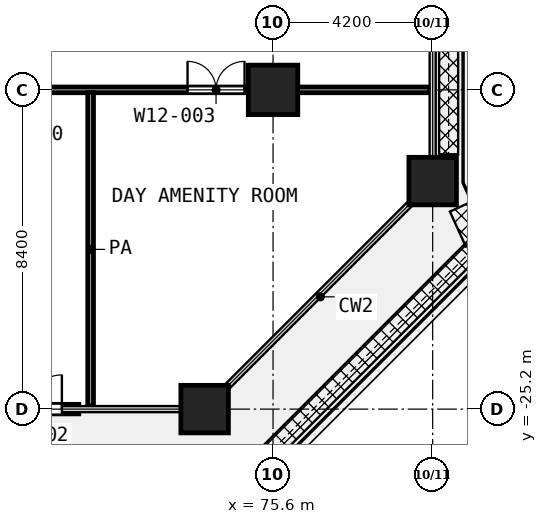
"""IFC4 building model, lengths in metres.
Left out: names, types, materials, properties, quantities, classifications, styles, units other than length and angle.
Written with IfcOpenShell. Run it as: python <this file> out.ifc"""

import sys

from ifc_helpers import new_model, si_unit, direction, frame, frame_2d, origin, origin_2d, place, context, subcontext, project, spatial, rectangle, extrude, element, fill, save


model = new_model("IFC4")
c1 = context("Model", 3, precision=1e-05, world=origin(), true_north=direction((0.0, 1.0)))
c2 = subcontext(c1, "Body", "Model", "MODEL_VIEW")
j1 = project(units=[si_unit("LENGTHUNIT", "METRE"), si_unit("PLANEANGLEUNIT", "RADIAN")], contexts=[c1])
p1 = place(None, origin())
s1 = spatial("IfcSite", under=j1, at=p1, CompositionType="ELEMENT")
p2 = place(p1, origin())
s2 = spatial("IfcBuilding", under=s1, at=p2, CompositionType="ELEMENT")
p3 = place(p2, frame((0.0, 0.0, 77.0)))
s3 = spatial("IfcBuildingStorey", under=s2, at=p3, CompositionType="ELEMENT", Elevation=77.0)
p4 = place(p3, frame((75.6, -16.8, 0.0), z_axis=(0.0, 0.0, 1.0), x_axis=(1.0, 0.0, 0.0)))
e1 = element("IfcColumn", 1, at=p4, inside=s3, PredefinedType="COLUMN", context=c2, shape_type="SweptSolid", body=[
    extrude(rectangle(XDim=1.3, YDim=1.3, at=origin_2d()), origin(), (0.0, 0.0, 1.0), 4.2),
])
for number, where, z_axis, x_axis in (
    (2, (79.8, -19.2, 0.0), (0.0, 0.0, 1.0), (1.0, 0.0, 0.0)),
    (3, (73.8, -25.2, 0.0), (0.0, 0.0, 1.0), (1.0, 0.0, 0.0)),
):
    element("IfcColumn", number, at=place(p3, frame(where, z_axis=z_axis, x_axis=x_axis)), inside=s3, PredefinedType="COLUMN", context=c2, shape_type="SweptSolid", body=[
        extrude(rectangle(XDim=1.25, YDim=1.25, at=origin_2d()), origin(), (0.0, 0.0, 1.0), 4.2),
    ])
p5 = place(p3, frame((67.8, -25.2, 0.0), z_axis=(0.0, 0.0, 1.0), x_axis=(1.0, 0.0, 0.0)))
e4 = element("IfcWall", 4, at=p5, inside=s3, PredefinedType="SOLIDWALL", context=c2, shape_type="SweptSolid", body=[
    extrude(rectangle(XDim=2.688, YDim=0.25, at=frame_2d((1.344, 0.0))), origin(), (0.0, 0.0, 1.0), 3.78),
])
p6 = place(p5, frame((0.444, 0.0, 0.0)))
e5 = element("IfcOpeningElement", 5, at=p6, cuts=e4, PredefinedType="OPENING", context=c2, shape_type="SweptSolid", body=[
    extrude(rectangle(XDim=1.8, YDim=2.1, at=frame_2d((0.9, 1.05))), frame((0.0, 0.135, 0.0), z_axis=(0.0, -1.0, 0.0), x_axis=(1.0, 0.0, 0.0)), (0.0, 0.0, 1.0), 0.27),
])
p7 = place(p3, frame((25.1, -16.8, 0.0), z_axis=(0.0, 0.0, 1.0), x_axis=(1.0, 0.0, 0.0)))
e6 = element("IfcWall", 6, at=p7, inside=s3, PredefinedType="PARTITIONING", context=c2, shape_type="SweptSolid", body=[
    extrude(rectangle(XDim=54.62, YDim=0.15, at=frame_2d((27.31, 0.0))), origin(), (0.0, 0.0, 1.0), 3.9),
])
p8 = place(p7, frame((1.45, 0.0, 0.0)))
e7 = element("IfcOpeningElement", 7, at=p8, cuts=e6, PredefinedType="OPENING", context=c2, shape_type="SweptSolid", body=[
    extrude(rectangle(XDim=1.5, YDim=2.1, at=frame_2d((0.75, 1.05))), frame((0.0, 0.085, 0.0), z_axis=(0.0, -1.0, 0.0), x_axis=(1.0, 0.0, 0.0)), (0.0, 0.0, 1.0), 0.17),
])
p9 = place(p7, frame((5.9, 0.0, 0.0)))
e8 = element("IfcOpeningElement", 8, at=p9, cuts=e6, PredefinedType="OPENING", context=c2, shape_type="SweptSolid", body=[
    extrude(rectangle(XDim=1.0, YDim=2.1, at=frame_2d((0.5, 1.05))), frame((0.0, 0.085, 0.0), z_axis=(0.0, -1.0, 0.0), x_axis=(1.0, 0.0, 0.0)), (0.0, 0.0, 1.0), 0.17),
])
p10 = place(p7, frame((10.0, 0.0, 0.0)))
e9 = element("IfcOpeningElement", 9, at=p10, cuts=e6, PredefinedType="OPENING", context=c2, shape_type="SweptSolid", body=[
    extrude(rectangle(XDim=1.2, YDim=2.1, at=frame_2d((0.6, 1.05))), frame((0.0, 0.085, 0.0), z_axis=(0.0, -1.0, 0.0), x_axis=(1.0, 0.0, 0.0)), (0.0, 0.0, 1.0), 0.17),
])
p11 = place(p7, frame((15.0, 0.0, 0.0)))
e10 = element("IfcOpeningElement", 10, at=p11, cuts=e6, PredefinedType="OPENING", context=c2, shape_type="SweptSolid", body=[
    extrude(rectangle(XDim=1.2, YDim=2.1, at=frame_2d((0.6, 1.05))), frame((0.0, 0.085, 0.0), z_axis=(0.0, -1.0, 0.0), x_axis=(1.0, 0.0, 0.0)), (0.0, 0.0, 1.0), 0.17),
])
p12 = place(p7, frame((18.1, 0.0, 0.0)))
e11 = element("IfcOpeningElement", 11, at=p12, cuts=e6, PredefinedType="OPENING", context=c2, shape_type="SweptSolid", body=[
    extrude(rectangle(XDim=1.2, YDim=2.1, at=frame_2d((0.6, 1.05))), frame((0.0, 0.085, 0.0), z_axis=(0.0, -1.0, 0.0), x_axis=(1.0, 0.0, 0.0)), (0.0, 0.0, 1.0), 0.17),
])
p13 = place(p7, frame((23.4, 0.0, 0.0)))
e12 = element("IfcOpeningElement", 12, at=p13, cuts=e6, PredefinedType="OPENING", context=c2, shape_type="SweptSolid", body=[
    extrude(rectangle(XDim=1.2, YDim=2.1, at=frame_2d((0.6, 1.05))), frame((0.0, 0.085, 0.0), z_axis=(0.0, -1.0, 0.0), x_axis=(1.0, 0.0, 0.0)), (0.0, 0.0, 1.0), 0.17),
])
p14 = place(p7, frame((21.95, 0.0, 0.0)))
e13 = element("IfcOpeningElement", 13, at=p14, cuts=e6, PredefinedType="OPENING", context=c2, shape_type="SweptSolid", body=[
    extrude(rectangle(XDim=1.1, YDim=2.1, at=frame_2d((0.55, 1.05))), frame((0.0, 0.085, 0.0), z_axis=(0.0, -1.0, 0.0), x_axis=(1.0, 0.0, 0.0)), (0.0, 0.0, 1.0), 0.17),
])
p15 = place(p7, frame((31.8, 0.0, 0.0)))
e14 = element("IfcOpeningElement", 14, at=p15, cuts=e6, PredefinedType="OPENING", context=c2, shape_type="SweptSolid", body=[
    extrude(rectangle(XDim=1.2, YDim=2.1, at=frame_2d((0.6, 1.05))), frame((0.0, 0.085, 0.0), z_axis=(0.0, -1.0, 0.0), x_axis=(1.0, 0.0, 0.0)), (0.0, 0.0, 1.0), 0.17),
])
p16 = place(p7, frame((34.7, 0.0, 0.0)))
e15 = element("IfcOpeningElement", 15, at=p16, cuts=e6, PredefinedType="OPENING", context=c2, shape_type="SweptSolid", body=[
    extrude(rectangle(XDim=1.2, YDim=2.1, at=frame_2d((0.6, 1.05))), frame((0.0, 0.085, 0.0), z_axis=(0.0, -1.0, 0.0), x_axis=(1.0, 0.0, 0.0)), (0.0, 0.0, 1.0), 0.17),
])
p17 = place(p7, frame((43.3, 0.0, 0.0)))
e16 = element("IfcOpeningElement", 16, at=p17, cuts=e6, PredefinedType="OPENING", context=c2, shape_type="SweptSolid", body=[
    extrude(rectangle(XDim=1.2, YDim=2.1, at=frame_2d((0.6, 1.05))), frame((0.0, 0.085, 0.0), z_axis=(0.0, -1.0, 0.0), x_axis=(1.0, 0.0, 0.0)), (0.0, 0.0, 1.0), 0.17),
])
p18 = place(p7, frame((40.5, 0.0, 0.0)))
e17 = element("IfcOpeningElement", 17, at=p18, cuts=e6, PredefinedType="OPENING", context=c2, shape_type="SweptSolid", body=[
    extrude(rectangle(XDim=0.9, YDim=2.1, at=frame_2d((0.45, 1.05))), frame((0.0, 0.085, 0.0), z_axis=(0.0, -1.0, 0.0), x_axis=(1.0, 0.0, 0.0)), (0.0, 0.0, 1.0), 0.17),
])
p19 = place(p7, frame((48.25, 0.0, 0.0)))
e18 = element("IfcOpeningElement", 18, at=p19, cuts=e6, PredefinedType="OPENING", context=c2, shape_type="SweptSolid", body=[
    extrude(rectangle(XDim=1.5, YDim=2.1, at=frame_2d((0.75, 1.05))), frame((0.0, 0.085, 0.0), z_axis=(0.0, -1.0, 0.0), x_axis=(1.0, 0.0, 0.0)), (0.0, 0.0, 1.0), 0.17),
])
p20 = place(p3, frame((70.8, -25.12, 0.0), z_axis=(0.0, 0.0, 1.0), x_axis=(0.0, 1.0, 0.0)))
e19 = element("IfcWall", 19, at=p20, inside=s3, PredefinedType="PARTITIONING", context=c2, shape_type="SweptSolid", body=[
    extrude(rectangle(XDim=8.245, YDim=0.15, at=frame_2d((4.123, 0.0))), origin(), (0.0, 0.0, 1.0), 3.9),
])
p21 = place(p6, origin())
e20 = element("IfcDoor", 20, at=p21, inside=s3, OperationType="DOUBLE_DOOR_SINGLE_SWING", PredefinedType="DOOR", context=c2, shape_type="SweptSolid", body=[
    extrude(rectangle(XDim=1.8, YDim=2.1, at=frame_2d((0.9, 1.05))), frame((0.0, 0.025, 0.0), z_axis=(0.0, -1.0, 0.0), x_axis=(1.0, 0.0, 0.0)), (0.0, 0.0, 1.0), 0.05),
])
fill(e5, e20)
p22 = place(p19, origin())
e21 = element("IfcDoor", 21, at=p22, inside=s3, OperationType="DOUBLE_DOOR_SINGLE_SWING", PredefinedType="DOOR", context=c2, shape_type="SweptSolid", body=[
    extrude(rectangle(XDim=1.5, YDim=2.1, at=frame_2d((0.75, 1.05))), frame((0.0, 0.025, 0.0), z_axis=(0.0, -1.0, 0.0), x_axis=(1.0, 0.0, 0.0)), (0.0, 0.0, 1.0), 0.05),
])
fill(e18, e21)
save(model, sys.argv[1])
